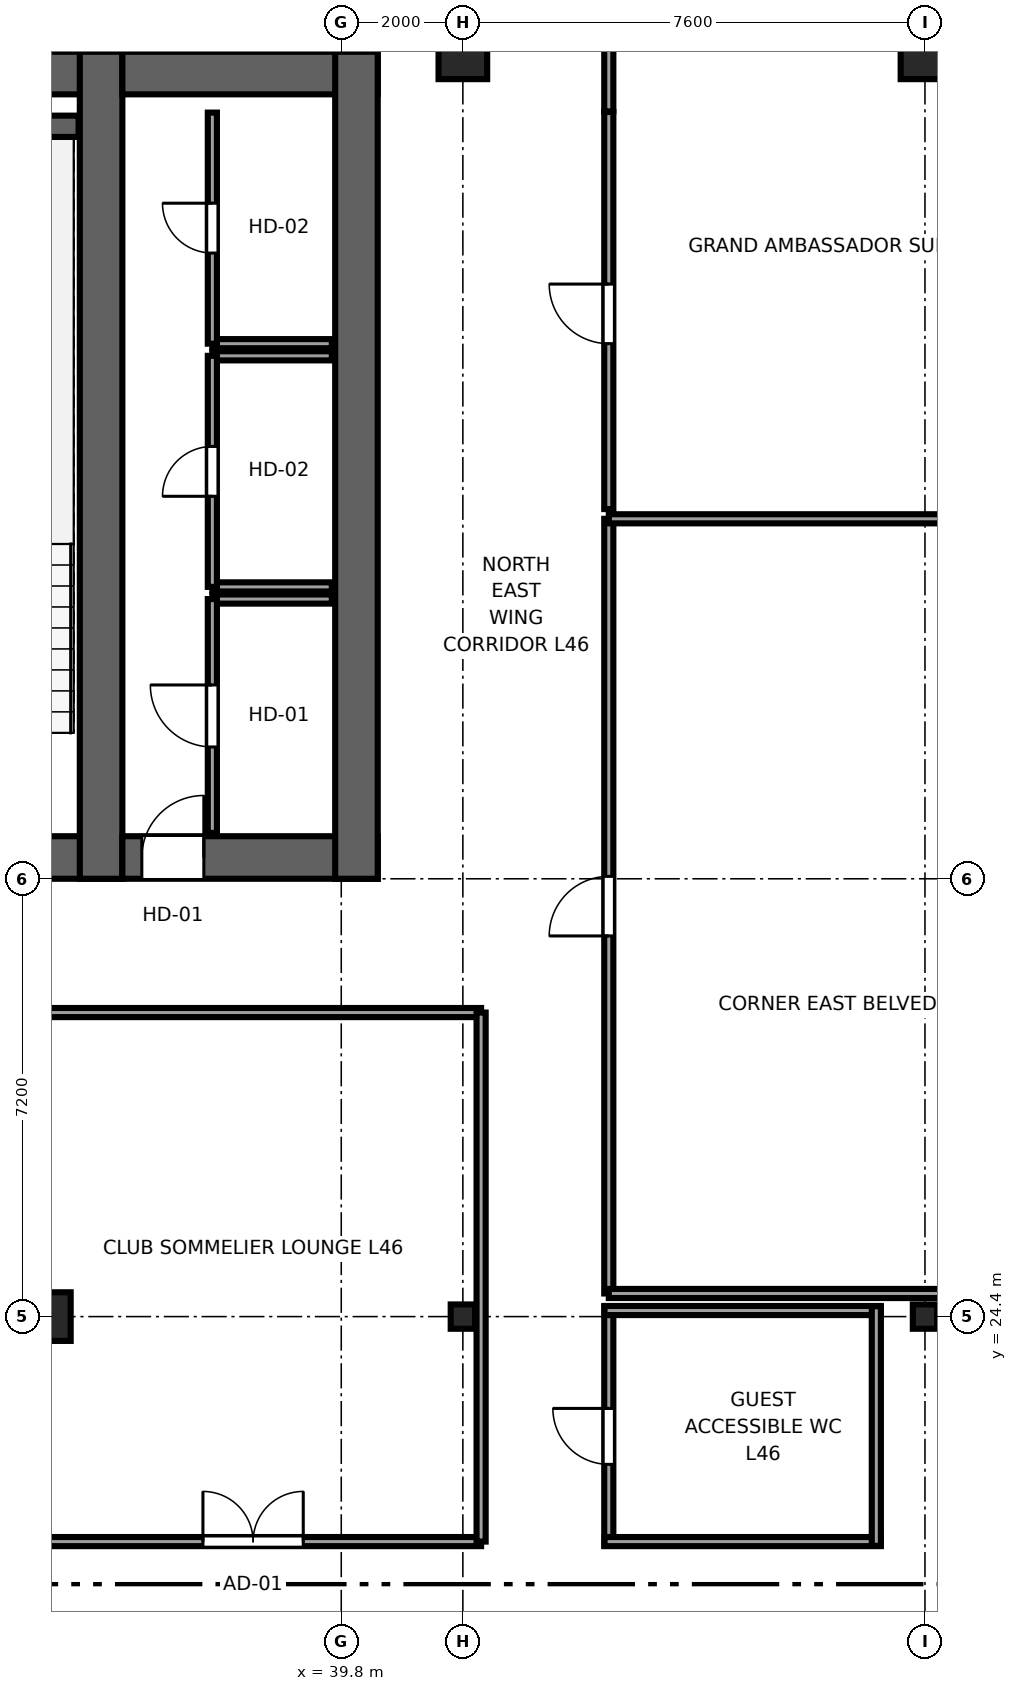
"""IFC4 building model, lengths in metres.
Left out: names, types, materials, properties, quantities, classifications, styles, units other than length and angle.
Written with IfcOpenShell. Run it as: python <this file> out.ifc"""

import sys

from ifc_helpers import new_model, si_unit, direction, frame, frame_2d, origin, origin_2d, place, context, subcontext, project, spatial, rectangle, i_section, extrude, source, transform, mapped, element, fill, save


model = new_model("IFC4")
c1 = context("Model", 3, precision=1e-05, world=origin(), true_north=direction((0.0, 1.0)))
c2 = subcontext(c1, "Body", "Model", "MODEL_VIEW")
j1 = project(units=[si_unit("LENGTHUNIT", "METRE"), si_unit("PLANEANGLEUNIT", "RADIAN")], contexts=[c1])
p1 = place(None, origin())
s1 = spatial("IfcSite", under=j1, at=p1, CompositionType="ELEMENT")
p2 = place(p1, origin())
s2 = spatial("IfcBuilding", under=s1, at=p2, CompositionType="ELEMENT")
p3 = place(p2, frame((0.0, 0.0, 175.45)))
s3 = spatial("IfcBuildingStorey", under=s2, at=p3, CompositionType="ELEMENT", Elevation=175.45)
p4 = place(p3, frame((9.8, 31.95, 0.0), z_axis=(0.0, 0.0, 1.0), x_axis=(1.0, 0.0, 0.0)))
e1 = element("IfcWall", 1, at=p4, inside=s3, PredefinedType="SHEAR", context=c2, shape_type="SweptSolid", body=[
    extrude(rectangle(XDim=26.4, YDim=0.7, at=frame_2d((13.2, 0.0))), origin(), (0.0, 0.0, 1.0), 3.55),
])
p5 = place(p4, frame((6.32, 0.0, 0.0), z_axis=(0.0, 0.0, 1.0), x_axis=(-1.0, 0.0, 0.0)))
e2 = element("IfcOpeningElement", 2, at=p5, cuts=e1, PredefinedType="OPENING", context=c2, shape_type="SweptSolid", body=[
    extrude(rectangle(XDim=1.5, YDim=2.04, at=frame_2d((0.75, 1.02))), frame((0.0, 0.36, 0.0), z_axis=(0.0, -1.0, 0.0), x_axis=(1.0, 0.0, 0.0)), (0.0, 0.0, 1.0), 0.72),
])
p6 = place(p4, frame((13.95, 0.0, 0.0), z_axis=(0.0, 0.0, 1.0), x_axis=(-1.0, 0.0, 0.0)))
e3 = element("IfcOpeningElement", 3, at=p6, cuts=e1, PredefinedType="OPENING", context=c2, shape_type="SweptSolid", body=[
    extrude(rectangle(XDim=1.5, YDim=2.04, at=frame_2d((0.75, 1.02))), frame((0.0, 0.36, 0.0), z_axis=(0.0, -1.0, 0.0), x_axis=(1.0, 0.0, 0.0)), (0.0, 0.0, 1.0), 0.72),
])
p7 = place(p4, frame((20.25, 0.0, 0.0), z_axis=(0.0, 0.0, 1.0), x_axis=(-1.0, 0.0, 0.0)))
e4 = element("IfcOpeningElement", 4, at=p7, cuts=e1, PredefinedType="OPENING", context=c2, shape_type="SweptSolid", body=[
    extrude(rectangle(XDim=1.5, YDim=2.04, at=frame_2d((0.75, 1.02))), frame((0.0, 0.36, 0.0), z_axis=(0.0, -1.0, 0.0), x_axis=(1.0, 0.0, 0.0)), (0.0, 0.0, 1.0), 0.72),
])
p8 = place(p4, frame((8.37, 0.0, 0.0), z_axis=(0.0, 0.0, 1.0), x_axis=(-1.0, 0.0, 0.0)))
e5 = element("IfcOpeningElement", 5, at=p8, cuts=e1, PredefinedType="OPENING", context=c2, shape_type="SweptSolid", body=[
    extrude(rectangle(XDim=0.82, YDim=2.01, at=frame_2d((0.41, 1.005))), frame((0.0, 0.36, 0.0), z_axis=(0.0, -1.0, 0.0), x_axis=(1.0, 0.0, 0.0)), (0.0, 0.0, 1.0), 0.72),
])
p9 = place(p3, frame((9.8, 44.85, 0.0), z_axis=(0.0, 0.0, 1.0), x_axis=(1.0, 0.0, 0.0)))
e6 = element("IfcWall", 6, at=p9, inside=s3, PredefinedType="SHEAR", context=c2, shape_type="SweptSolid", body=[
    extrude(rectangle(XDim=26.4, YDim=0.7, at=frame_2d((13.2, 0.0))), origin(), (0.0, 0.0, 1.0), 3.55),
])
p10 = place(p3, frame((35.85, 31.6, 0.0), z_axis=(0.0, 0.0, 1.0), x_axis=(0.0, 1.0, 0.0)))
e7 = element("IfcWall", 7, at=p10, inside=s3, PredefinedType="SHEAR", context=c2, shape_type="SweptSolid", body=[
    extrude(rectangle(XDim=13.6, YDim=0.7, at=frame_2d((6.8, 0.0))), origin(), (0.0, 0.0, 1.0), 3.55),
])
p11 = place(p3, frame((36.2, 31.95, 0.0), z_axis=(0.0, 0.0, 1.0), x_axis=(1.0, 0.0, 0.0)))
e8 = element("IfcWall", 8, at=p11, inside=s3, PredefinedType="SHEAR", context=c2, shape_type="SweptSolid", body=[
    extrude(rectangle(XDim=4.2, YDim=0.7, at=frame_2d((2.1, 0.0))), origin(), (0.0, 0.0, 1.0), 3.55),
])
p12 = place(p11, frame((1.34, 0.0, 0.0), z_axis=(0.0, 0.0, 1.0), x_axis=(-1.0, 0.0, 0.0)))
e9 = element("IfcOpeningElement", 9, at=p12, cuts=e8, PredefinedType="OPENING", context=c2, shape_type="SweptSolid", body=[
    extrude(rectangle(XDim=1.02, YDim=2.03, at=frame_2d((0.51, 1.015))), frame((0.0, 0.36, 0.0), z_axis=(0.0, -1.0, 0.0), x_axis=(1.0, 0.0, 0.0)), (0.0, 0.0, 1.0), 0.72),
])
p13 = place(p3, frame((36.2, 44.85, 0.0), z_axis=(0.0, 0.0, 1.0), x_axis=(1.0, 0.0, 0.0)))
e10 = element("IfcWall", 10, at=p13, inside=s3, PredefinedType="SHEAR", context=c2, shape_type="SweptSolid", body=[
    extrude(rectangle(XDim=4.2, YDim=0.7, at=frame_2d((2.1, 0.0))), origin(), (0.0, 0.0, 1.0), 3.55),
])
p14 = place(p3, frame((40.05, 31.6, 0.0), z_axis=(0.0, 0.0, 1.0), x_axis=(0.0, 1.0, 0.0)))
e11 = element("IfcWall", 11, at=p14, inside=s3, PredefinedType="SHEAR", context=c2, shape_type="SweptSolid", body=[
    extrude(rectangle(XDim=13.6, YDim=0.7, at=frame_2d((6.8, 0.0))), origin(), (0.0, 0.0, 1.0), 3.55),
])
p15 = place(p3, frame((31.88, 43.975, 0.0), z_axis=(0.0, 0.0, 1.0), x_axis=(1.0, 0.0, 0.0)))
e12 = element("IfcWall", 12, at=p15, inside=s3, PredefinedType="SHEAR", context=c2, shape_type="SweptSolid", body=[
    extrude(rectangle(XDim=3.6, YDim=0.35, at=frame_2d((1.8, 0.0))), origin(), (0.0, 0.0, 1.0), 3.55),
])
m1 = source(origin(), c2, "Body", "SweptSolid", [
    extrude(rectangle(XDim=0.8, YDim=0.8, at=origin_2d()), origin(), (0.0, 0.0, 1.0), 3.55),
])
p16 = place(p3, frame((34.95, 24.4, 0.0), z_axis=(0.0, 0.0, 1.0), x_axis=(1.0, 0.0, 0.0)))
e13 = element("IfcColumn", 13, at=p16, inside=s3, PredefinedType="COLUMN", context=c2, shape_type="MappedRepresentation", body=[
    mapped(m1, transform((0.0, 0.0, 0.0), x_axis=(1.0, 0.0, 0.0), y_axis=(0.0, 1.0, 0.0), z_axis=(0.0, 0.0, 1.0), scale=1.0)),
])
m2 = source(origin(), c2, "Body", "SweptSolid", [
    extrude(i_section(OverallWidth=0.4, OverallDepth=0.4, WebThickness=0.02, FlangeThickness=0.035, at=origin_2d()), origin(), (0.0, 0.0, 1.0), 3.55),
])
for number, where, z_axis, x_axis in (
    (14, (41.8, 24.4, 0.0), (0.0, 0.0, 1.0), (1.0, 0.0, 0.0)),
    (15, (49.4, 24.4, 0.0), (0.0, 0.0, 1.0), (1.0, 0.0, 0.0)),
):
    element("IfcColumn", number, at=place(p3, frame(where, z_axis=z_axis, x_axis=x_axis)), inside=s3, PredefinedType="COLUMN", context=c2, shape_type="MappedRepresentation", body=[
        mapped(m2, transform((0.0, 0.0, 0.0), x_axis=(1.0, 0.0, 0.0), y_axis=(0.0, 1.0, 0.0), z_axis=(0.0, 0.0, 1.0), scale=1.0)),
    ])
for number, where, z_axis, x_axis in (
    (16, (41.8, 45.15, 0.0), (0.0, 0.0, 1.0), (1.0, 0.0, 0.0)),
    (17, (49.4, 45.15, 0.0), (0.0, 0.0, 1.0), (1.0, 0.0, 0.0)),
):
    element("IfcColumn", number, at=place(p3, frame(where, z_axis=z_axis, x_axis=x_axis)), inside=s3, PredefinedType="COLUMN", context=c2, shape_type="MappedRepresentation", body=[
        mapped(m1, transform((0.0, 0.0, 0.0), x_axis=(1.0, 0.0, 0.0), y_axis=(0.0, 1.0, 0.0), z_axis=(0.0, 0.0, 1.0), scale=1.0)),
    ])
p17 = place(p3, frame((37.68, 36.2, 0.0), z_axis=(0.0, 0.0, 1.0), x_axis=(1.0, 0.0, 0.0)))
e18 = element("IfcWall", 18, at=p17, inside=s3, PredefinedType="PARTITIONING", context=c2, shape_type="SweptSolid", body=[
    extrude(rectangle(XDim=1.965, YDim=0.15, at=frame_2d((0.982, 0.0))), origin(), (0.0, 0.0, 1.0), 3.37),
])
p18 = place(p3, frame((37.68, 32.355, 0.0), z_axis=(0.0, 0.0, 1.0), x_axis=(0.0, 1.0, 0.0)))
e19 = element("IfcWall", 19, at=p18, inside=s3, PredefinedType="PARTITIONING", context=c2, shape_type="SweptSolid", body=[
    extrude(rectangle(XDim=3.845, YDim=0.15, at=frame_2d((1.922, 0.0))), origin(), (0.0, 0.0, 1.0), 3.37),
])
p19 = place(p18, frame((1.413, 0.0, 0.0)))
e20 = element("IfcOpeningElement", 20, at=p19, cuts=e19, PredefinedType="OPENING", context=c2, shape_type="SweptSolid", body=[
    extrude(rectangle(XDim=1.02, YDim=2.03, at=frame_2d((0.51, 1.015))), frame((0.0, 0.085, 0.0), z_axis=(0.0, -1.0, 0.0), x_axis=(1.0, 0.0, 0.0)), (0.0, 0.0, 1.0), 0.17),
])
for number, where, z_axis, x_axis in (
    (21, (37.68, 36.4, 0.0), (0.0, 0.0, 1.0), (1.0, 0.0, 0.0)),
    (22, (37.68, 40.2, 0.0), (0.0, 0.0, 1.0), (1.0, 0.0, 0.0)),
):
    element("IfcWall", number, at=place(p3, frame(where, z_axis=z_axis, x_axis=x_axis)), inside=s3, PredefinedType="PARTITIONING", context=c2, shape_type="SweptSolid", body=[
        extrude(rectangle(XDim=1.965, YDim=0.15, at=frame_2d((0.982, 0.0))), origin(), (0.0, 0.0, 1.0), 3.37),
    ])
p20 = place(p3, frame((37.68, 36.4, 0.0), z_axis=(0.0, 0.0, 1.0), x_axis=(0.0, 1.0, 0.0)))
e23 = element("IfcWall", 23, at=p20, inside=s3, PredefinedType="PARTITIONING", context=c2, shape_type="SweptSolid", body=[
    extrude(rectangle(XDim=3.8, YDim=0.15, at=frame_2d((1.9, 0.0))), origin(), (0.0, 0.0, 1.0), 3.37),
])
p21 = place(p20, frame((1.49, 0.0, 0.0)))
e24 = element("IfcOpeningElement", 24, at=p21, cuts=e23, PredefinedType="OPENING", context=c2, shape_type="SweptSolid", body=[
    extrude(rectangle(XDim=0.82, YDim=2.01, at=frame_2d((0.41, 1.005))), frame((0.0, 0.085, 0.0), z_axis=(0.0, -1.0, 0.0), x_axis=(1.0, 0.0, 0.0)), (0.0, 0.0, 1.0), 0.17),
])
p22 = place(p3, frame((37.68, 40.4, 0.0), z_axis=(0.0, 0.0, 1.0), x_axis=(1.0, 0.0, 0.0)))
e25 = element("IfcWall", 25, at=p22, inside=s3, PredefinedType="PARTITIONING", context=c2, shape_type="SweptSolid", body=[
    extrude(rectangle(XDim=1.965, YDim=0.15, at=frame_2d((0.982, 0.0))), origin(), (0.0, 0.0, 1.0), 3.37),
])
p23 = place(p3, frame((37.68, 40.4, 0.0), z_axis=(0.0, 0.0, 1.0), x_axis=(0.0, 1.0, 0.0)))
e26 = element("IfcWall", 26, at=p23, inside=s3, PredefinedType="PARTITIONING", context=c2, shape_type="SweptSolid", body=[
    extrude(rectangle(XDim=3.8, YDim=0.15, at=frame_2d((1.9, 0.0))), origin(), (0.0, 0.0, 1.0), 3.37),
])
p24 = place(p23, frame((1.49, 0.0, 0.0)))
e27 = element("IfcOpeningElement", 27, at=p24, cuts=e26, PredefinedType="OPENING", context=c2, shape_type="SweptSolid", body=[
    extrude(rectangle(XDim=0.82, YDim=2.01, at=frame_2d((0.41, 1.005))), frame((0.0, 0.085, 0.0), z_axis=(0.0, -1.0, 0.0), x_axis=(1.0, 0.0, 0.0)), (0.0, 0.0, 1.0), 0.17),
])
p25 = place(p3, frame((44.2, 20.63, 0.0), z_axis=(0.0, 0.0, 1.0), x_axis=(0.0, 1.0, 0.0)))
e28 = element("IfcWall", 28, at=p25, inside=s3, PredefinedType="PARTITIONING", context=c2, shape_type="SweptSolid", body=[
    extrude(rectangle(XDim=3.94, YDim=0.15, at=frame_2d((1.97, 0.0))), origin(), (0.0, 0.0, 1.0), 3.37),
])
p26 = place(p25, frame((1.34, 0.0, 0.0)))
e29 = element("IfcOpeningElement", 29, at=p26, cuts=e28, PredefinedType="OPENING", context=c2, shape_type="SweptSolid", body=[
    extrude(rectangle(XDim=0.92, YDim=2.01, at=frame_2d((0.46, 1.005))), frame((0.0, 0.085, 0.0), z_axis=(0.0, -1.0, 0.0), x_axis=(1.0, 0.0, 0.0)), (0.0, 0.0, 1.0), 0.17),
])
p27 = place(p3, frame((44.13, 20.7, 0.0), z_axis=(0.0, 0.0, 1.0), x_axis=(1.0, 0.0, 0.0)))
e30 = element("IfcWall", 30, at=p27, inside=s3, PredefinedType="PARTITIONING", context=c2, shape_type="SweptSolid", body=[
    extrude(rectangle(XDim=4.54, YDim=0.15, at=frame_2d((2.27, 0.0))), origin(), (0.0, 0.0, 1.0), 3.37),
])
p28 = place(p3, frame((44.13, 24.5, 0.0), z_axis=(0.0, 0.0, 1.0), x_axis=(1.0, 0.0, 0.0)))
e31 = element("IfcWall", 31, at=p28, inside=s3, PredefinedType="PARTITIONING", context=c2, shape_type="SweptSolid", body=[
    extrude(rectangle(XDim=4.54, YDim=0.15, at=frame_2d((2.27, 0.0))), origin(), (0.0, 0.0, 1.0), 2.758),
])
p29 = place(p3, frame((48.6, 20.63, 0.0), z_axis=(0.0, 0.0, 1.0), x_axis=(0.0, 1.0, 0.0)))
e32 = element("IfcWall", 32, at=p29, inside=s3, PredefinedType="PARTITIONING", context=c2, shape_type="SweptSolid", body=[
    extrude(rectangle(XDim=3.94, YDim=0.15, at=frame_2d((1.97, 0.0))), origin(), (0.0, 0.0, 1.0), 3.37),
])
p30 = place(p3, frame((44.2, 24.78, 0.0), z_axis=(0.0, 0.0, 1.0), x_axis=(0.0, 1.0, 0.0)))
e33 = element("IfcWall", 33, at=p30, inside=s3, PredefinedType="PARTITIONING", context=c2, shape_type="SweptSolid", body=[
    extrude(rectangle(XDim=12.74, YDim=0.15, at=frame_2d((6.37, 0.0))), origin(), (0.0, 0.0, 1.0), 3.37),
])
p31 = place(p30, frame((5.88, 0.0, 0.0)))
e34 = element("IfcOpeningElement", 34, at=p31, cuts=e33, PredefinedType="OPENING", context=c2, shape_type="SweptSolid", body=[
    extrude(rectangle(XDim=0.98, YDim=2.12, at=frame_2d((0.49, 1.06))), frame((0.0, 0.085, 0.0), z_axis=(0.0, -1.0, 0.0), x_axis=(1.0, 0.0, 0.0)), (0.0, 0.0, 1.0), 0.17),
])
p32 = place(p3, frame((44.2, 24.78, 0.0), z_axis=(0.0, 0.0, 1.0), x_axis=(1.0, 0.0, 0.0)))
e35 = element("IfcWall", 35, at=p32, inside=s3, PredefinedType="PARTITIONING", context=c2, shape_type="SweptSolid", body=[
    extrude(rectangle(XDim=9.795, YDim=0.15, at=frame_2d((4.897, 0.0))), origin(), (0.0, 0.0, 1.0), 3.37),
])
p33 = place(p3, frame((44.2, 37.52, 0.0), z_axis=(0.0, 0.0, 1.0), x_axis=(1.0, 0.0, 0.0)))
e36 = element("IfcWall", 36, at=p33, inside=s3, PredefinedType="PARTITIONING", context=c2, shape_type="SweptSolid", body=[
    extrude(rectangle(XDim=7.43, YDim=0.15, at=frame_2d((3.715, 0.0))), origin(), (0.0, 0.0, 1.0), 3.37),
])
p34 = place(p3, frame((44.2, 37.68, 0.0), z_axis=(0.0, 0.0, 1.0), x_axis=(0.0, 1.0, 0.0)))
e37 = element("IfcWall", 37, at=p34, inside=s3, PredefinedType="PARTITIONING", context=c2, shape_type="SweptSolid", body=[
    extrude(rectangle(XDim=6.53, YDim=0.15, at=frame_2d((3.265, 0.0))), origin(), (0.0, 0.0, 1.0), 3.37),
])
p35 = place(p34, frame((2.72, 0.0, 0.0)))
e38 = element("IfcOpeningElement", 38, at=p35, cuts=e37, PredefinedType="OPENING", context=c2, shape_type="SweptSolid", body=[
    extrude(rectangle(XDim=0.98, YDim=2.12, at=frame_2d((0.49, 1.06))), frame((0.0, 0.085, 0.0), z_axis=(0.0, -1.0, 0.0), x_axis=(1.0, 0.0, 0.0)), (0.0, 0.0, 1.0), 0.17),
])
p36 = place(p3, frame((44.2, 44.22, 0.0), z_axis=(0.0, 0.0, 1.0), x_axis=(0.0, 1.0, 0.0)))
e39 = element("IfcWall", 39, at=p36, inside=s3, PredefinedType="PARTITIONING", context=c2, shape_type="SweptSolid", body=[
    extrude(rectangle(XDim=1.375, YDim=0.15, at=frame_2d((0.688, 0.0))), origin(), (0.0, 0.0, 1.0), 3.37),
])
p37 = place(p3, frame((34.6, 20.7, 0.0), z_axis=(0.0, 0.0, 1.0), x_axis=(1.0, 0.0, 0.0)))
e40 = element("IfcWall", 40, at=p37, inside=s3, PredefinedType="PARTITIONING", context=c2, shape_type="SweptSolid", body=[
    extrude(rectangle(XDim=7.5, YDim=0.15, at=frame_2d((3.75, 0.0))), origin(), (0.0, 0.0, 1.0), 3.37),
])
p38 = place(p37, frame((2.925, 0.0, 0.0)))
e41 = element("IfcOpeningElement", 41, at=p38, cuts=e40, PredefinedType="OPENING", context=c2, shape_type="SweptSolid", body=[
    extrude(rectangle(XDim=1.65, YDim=2.15, at=frame_2d((0.825, 1.075))), frame((0.0, 0.085, 0.0), z_axis=(0.0, -1.0, 0.0), x_axis=(1.0, 0.0, 0.0)), (0.0, 0.0, 1.0), 0.17),
])
p39 = place(p3, frame((34.6, 29.4, 0.0), z_axis=(0.0, 0.0, 1.0), x_axis=(1.0, 0.0, 0.0)))
e42 = element("IfcWall", 42, at=p39, inside=s3, PredefinedType="PARTITIONING", context=c2, shape_type="SweptSolid", body=[
    extrude(rectangle(XDim=7.5, YDim=0.15, at=frame_2d((3.75, 0.0))), origin(), (0.0, 0.0, 1.0), 3.37),
])
p40 = place(p3, frame((42.1, 20.7, 0.0), z_axis=(0.0, 0.0, 1.0), x_axis=(0.0, 1.0, 0.0)))
e43 = element("IfcWall", 43, at=p40, inside=s3, PredefinedType="PARTITIONING", context=c2, shape_type="SweptSolid", body=[
    extrude(rectangle(XDim=8.7, YDim=0.15, at=frame_2d((4.35, 0.0))), origin(), (0.0, 0.0, 1.0), 2.16),
])
m3 = source(origin(), c2, "Body", "SweptSolid", [
    extrude(rectangle(XDim=1.02, YDim=2.03, at=frame_2d((0.51, 1.015))), frame((0.0, 0.025, 0.0), z_axis=(0.0, -1.0, 0.0), x_axis=(1.0, 0.0, 0.0)), (0.0, 0.0, 1.0), 0.05),
])
p41 = place(p12, origin())
e44 = element("IfcDoor", 44, at=p41, inside=s3, OperationType="SINGLE_SWING_RIGHT", PredefinedType="DOOR", context=c2, shape_type="MappedRepresentation", body=[
    mapped(m3, transform((0.0, 0.0, 0.0), x_axis=(1.0, 0.0, 0.0), y_axis=(0.0, 1.0, 0.0), z_axis=(0.0, 0.0, 1.0), scale=1.0)),
])
fill(e9, e44)
p42 = place(p19, origin())
e45 = element("IfcDoor", 45, at=p42, inside=s3, OperationType="SINGLE_SWING_RIGHT", PredefinedType="DOOR", context=c2, shape_type="MappedRepresentation", body=[
    mapped(m3, transform((0.0, 0.0, 0.0), x_axis=(1.0, 0.0, 0.0), y_axis=(0.0, 1.0, 0.0), z_axis=(0.0, 0.0, 1.0), scale=1.0)),
])
fill(e20, e45)
m4 = source(origin(), c2, "Body", "SweptSolid", [
    extrude(rectangle(XDim=0.82, YDim=2.01, at=frame_2d((0.41, 1.005))), frame((0.0, 0.025, 0.0), z_axis=(0.0, -1.0, 0.0), x_axis=(1.0, 0.0, 0.0)), (0.0, 0.0, 1.0), 0.05),
])
p43 = place(p21, origin())
e46 = element("IfcDoor", 46, at=p43, inside=s3, OperationType="SINGLE_SWING_LEFT", PredefinedType="DOOR", context=c2, shape_type="MappedRepresentation", body=[
    mapped(m4, transform((0.0, 0.0, 0.0), x_axis=(1.0, 0.0, 0.0), y_axis=(0.0, 1.0, 0.0), z_axis=(0.0, 0.0, 1.0), scale=1.0)),
])
fill(e24, e46)
p44 = place(p24, origin())
e47 = element("IfcDoor", 47, at=p44, inside=s3, OperationType="SINGLE_SWING_RIGHT", PredefinedType="DOOR", context=c2, shape_type="MappedRepresentation", body=[
    mapped(m4, transform((0.0, 0.0, 0.0), x_axis=(1.0, 0.0, 0.0), y_axis=(0.0, 1.0, 0.0), z_axis=(0.0, 0.0, 1.0), scale=1.0)),
])
fill(e27, e47)
m5 = source(origin(), c2, "Body", "SweptSolid", [
    extrude(rectangle(XDim=0.92, YDim=2.01, at=frame_2d((0.46, 1.005))), frame((0.0, 0.025, 0.0), z_axis=(0.0, -1.0, 0.0), x_axis=(1.0, 0.0, 0.0)), (0.0, 0.0, 1.0), 0.05),
])
p45 = place(p26, origin())
e48 = element("IfcDoor", 48, at=p45, inside=s3, OperationType="SINGLE_SWING_RIGHT", PredefinedType="DOOR", context=c2, shape_type="MappedRepresentation", body=[
    mapped(m5, transform((0.0, 0.0, 0.0), x_axis=(1.0, 0.0, 0.0), y_axis=(0.0, 1.0, 0.0), z_axis=(0.0, 0.0, 1.0), scale=1.0)),
])
fill(e29, e48)
m6 = source(origin(), c2, "Body", "SweptSolid", [
    extrude(rectangle(XDim=0.98, YDim=2.12, at=frame_2d((0.49, 1.06))), frame((0.0, 0.025, 0.0), z_axis=(0.0, -1.0, 0.0), x_axis=(1.0, 0.0, 0.0)), (0.0, 0.0, 1.0), 0.05),
])
p46 = place(p31, origin())
e49 = element("IfcDoor", 49, at=p46, inside=s3, OperationType="SINGLE_SWING_LEFT", PredefinedType="DOOR", context=c2, shape_type="MappedRepresentation", body=[
    mapped(m6, transform((0.0, 0.0, 0.0), x_axis=(1.0, 0.0, 0.0), y_axis=(0.0, 1.0, 0.0), z_axis=(0.0, 0.0, 1.0), scale=1.0)),
])
fill(e34, e49)
p47 = place(p35, origin())
e50 = element("IfcDoor", 50, at=p47, inside=s3, OperationType="SINGLE_SWING_RIGHT", PredefinedType="DOOR", context=c2, shape_type="MappedRepresentation", body=[
    mapped(m6, transform((0.0, 0.0, 0.0), x_axis=(1.0, 0.0, 0.0), y_axis=(0.0, 1.0, 0.0), z_axis=(0.0, 0.0, 1.0), scale=1.0)),
])
fill(e38, e50)
m7 = source(origin(), c2, "Body", "SweptSolid", [
    extrude(rectangle(XDim=1.65, YDim=2.15, at=frame_2d((0.825, 1.075))), frame((0.0, 0.025, 0.0), z_axis=(0.0, -1.0, 0.0), x_axis=(1.0, 0.0, 0.0)), (0.0, 0.0, 1.0), 0.05),
])
p48 = place(p38, origin())
e51 = element("IfcDoor", 51, at=p48, inside=s3, OperationType="DOUBLE_DOOR_SINGLE_SWING", PredefinedType="DOOR", context=c2, shape_type="MappedRepresentation", body=[
    mapped(m7, transform((0.0, 0.0, 0.0), x_axis=(1.0, 0.0, 0.0), y_axis=(0.0, 1.0, 0.0), z_axis=(0.0, 0.0, 1.0), scale=1.0)),
])
fill(e41, e51)
save(model, sys.argv[1])
